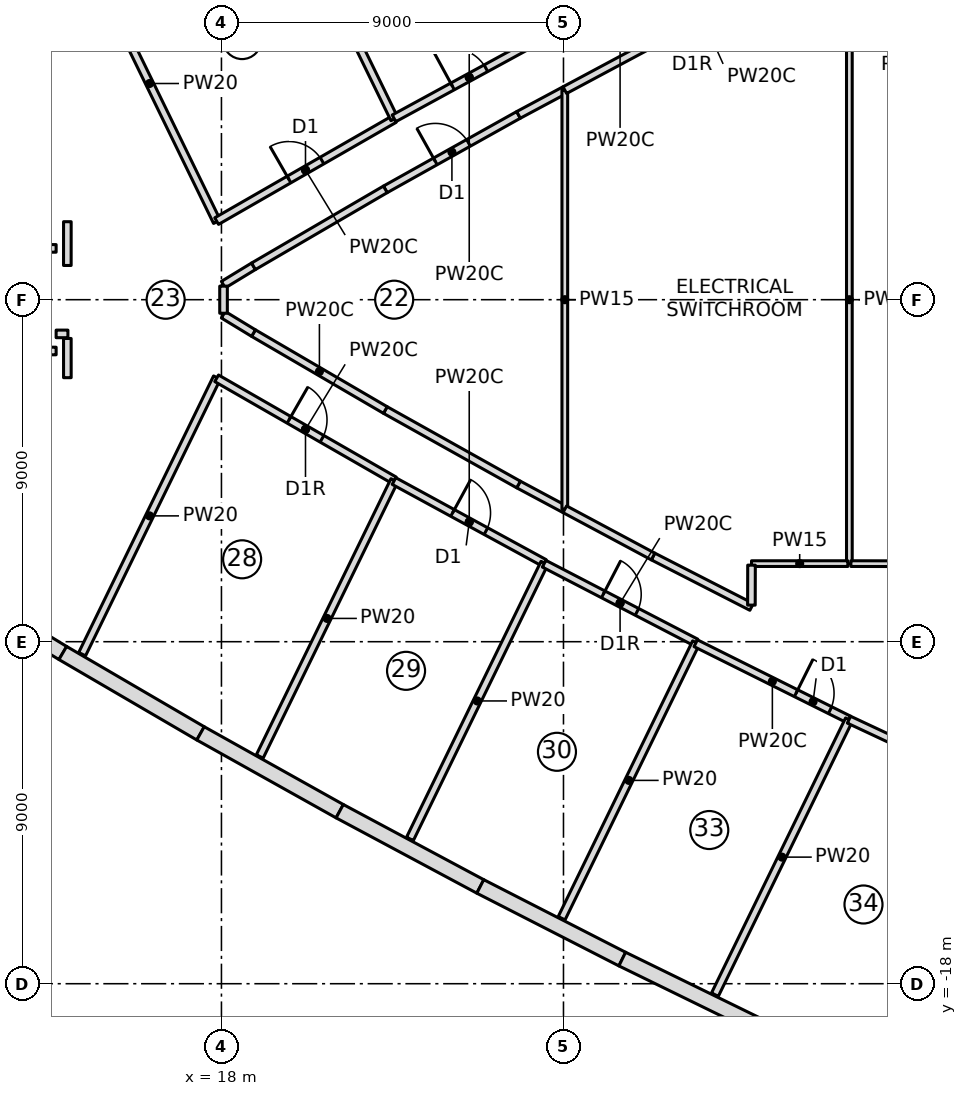
"""IFC4 building model, lengths in metres.
Left out: names, types, materials, properties, quantities, classifications, styles, units other than length and angle.
Written with IfcOpenShell. Run it as: python <this file> out.ifc"""

import sys

from ifc_helpers import new_model, si_unit, direction, frame, frame_2d, origin, place, context, subcontext, project, spatial, polyline, rectangle, outline, extrude, element, fill, save


model = new_model("IFC4")
c1 = context("Model", 3, precision=1e-05, world=origin(), true_north=direction((0.0, 1.0)))
c2 = subcontext(c1, "Body", "Model", "MODEL_VIEW")
j1 = project(units=[si_unit("LENGTHUNIT", "METRE"), si_unit("PLANEANGLEUNIT", "RADIAN")], contexts=[c1])
p1 = place(None, origin())
s1 = spatial("IfcSite", under=j1, at=p1, CompositionType="ELEMENT")
p2 = place(p1, origin())
s2 = spatial("IfcBuilding", under=s1, at=p2, CompositionType="ELEMENT")
p3 = place(p2, frame((0.0, 0.0, 29.0)))
s3 = spatial("IfcBuildingStorey", under=s2, at=p3, CompositionType="ELEMENT", Elevation=29.0)
p4 = place(p3, frame((10.242, -7.116, 0.0), z_axis=(0.0, 0.0, 1.0), x_axis=(0.854262587683, -0.519841736767, 0.0)))
e1 = element("IfcWall", 1, at=p4, inside=s3, PredefinedType="NOTDEFINED", context=c2, shape_type="SweptSolid", body=[
    extrude(outline(polyline([(-0.002, -0.2), (4.198, -0.2), (4.195, 0.2), (0.002, 0.2), (-0.002, -0.2)])), origin(), (0.0, 0.0, 1.0), 5.7),
])
p5 = place(p3, frame((13.826, -9.298, 0.0), z_axis=(0.0, 0.0, 1.0), x_axis=(0.863702918535, -0.504001258445, 0.0)))
e2 = element("IfcWall", 2, at=p5, inside=s3, PredefinedType="NOTDEFINED", context=c2, shape_type="SweptSolid", body=[
    extrude(outline(polyline([(-0.002, -0.2), (4.198, -0.2), (4.194, 0.2), (0.002, 0.2), (-0.002, -0.2)])), origin(), (0.0, 0.0, 1.0), 5.7),
])
p6 = place(p3, frame((17.45, -11.413, 0.0), z_axis=(0.0, 0.0, 1.0), x_axis=(0.872792595997, -0.488091266437, 0.0)))
e3 = element("IfcWall", 3, at=p6, inside=s3, PredefinedType="NOTDEFINED", context=c2, shape_type="SweptSolid", body=[
    extrude(outline(polyline([(-0.002, -0.2), (4.198, -0.2), (4.194, 0.2), (0.002, 0.2), (-0.002, -0.2)])), origin(), (0.0, 0.0, 1.0), 5.7),
])
p7 = place(p3, frame((21.113, -13.461, 0.0), z_axis=(0.0, 0.0, 1.0), x_axis=(0.881678826745, -0.471850025399, 0.0)))
e4 = element("IfcWall", 4, at=p7, inside=s3, PredefinedType="NOTDEFINED", context=c2, shape_type="SweptSolid", body=[
    extrude(outline(polyline([(-0.002, -0.2), (4.198, -0.2), (4.195, 0.2), (0.002, 0.2), (-0.002, -0.2)])), origin(), (0.0, 0.0, 1.0), 5.7),
])
p8 = place(p3, frame((24.812, -15.441, 0.0), z_axis=(0.0, 0.0, 1.0), x_axis=(0.890186701742, -0.455595913108, 0.0)))
e5 = element("IfcWall", 5, at=p8, inside=s3, PredefinedType="NOTDEFINED", context=c2, shape_type="SweptSolid", body=[
    extrude(outline(polyline([(-0.002, -0.2), (4.198, -0.2), (4.194, 0.2), (0.002, 0.2), (-0.002, -0.2)])), origin(), (0.0, 0.0, 1.0), 5.7),
])
p9 = place(p3, frame((28.548, -17.352, 0.0), z_axis=(0.0, 0.0, 1.0), x_axis=(0.898405787198, -0.439166302815, 0.0)))
e6 = element("IfcWall", 6, at=p9, inside=s3, PredefinedType="NOTDEFINED", context=c2, shape_type="SweptSolid", body=[
    extrude(outline(polyline([(-0.002, -0.2), (4.198, -0.2), (4.194, 0.2), (0.002, 0.2), (-0.002, -0.2)])), origin(), (0.0, 0.0, 1.0), 5.7),
])
p10 = place(p3, frame((17.882, 2.05, 0.0), z_axis=(0.0, 0.0, 1.0), x_axis=(-0.43821747413, 0.898868981202, 0.0)))
e7 = element("IfcWall", 7, at=p10, inside=s3, PredefinedType="PARTITIONING", context=c2, shape_type="SweptSolid", body=[
    extrude(rectangle(XDim=8.097, YDim=0.2, at=frame_2d((4.048, 0.0))), origin(), (0.0, 0.0, 1.0), 5.7),
])
p11 = place(p3, frame((17.874, 2.068, 0.0), z_axis=(0.0, 0.0, 1.0), x_axis=(0.867093061484, 0.4981461861, 0.0)))
e8 = element("IfcWall", 8, at=p11, inside=s3, PredefinedType="PARTITIONING", context=c2, shape_type="SweptSolid", body=[
    extrude(rectangle(XDim=5.393, YDim=0.2, at=frame_2d((2.697, 0.0))), origin(), (0.0, 0.0, 1.0), 5.7),
])
p12 = place(p11, frame((2.197, 0.0, 0.0)))
e9 = element("IfcOpeningElement", 9, at=p12, cuts=e8, PredefinedType="OPENING", context=c2, shape_type="SweptSolid", body=[
    extrude(rectangle(XDim=1.0, YDim=2.1, at=frame_2d((0.5, 1.05))), frame((0.0, 0.11, 0.0), z_axis=(0.0, -1.0, 0.0), x_axis=(1.0, 0.0, 0.0)), (0.0, 0.0, 1.0), 0.22),
])
p13 = place(p3, frame((22.55, 4.755, 0.0), z_axis=(0.0, 0.0, 1.0), x_axis=(-0.43821414459, 0.898870604415, 0.0)))
e10 = element("IfcWall", 10, at=p13, inside=s3, PredefinedType="PARTITIONING", context=c2, shape_type="SweptSolid", body=[
    extrude(rectangle(XDim=8.083, YDim=0.2, at=frame_2d((4.042, 0.0))), origin(), (0.0, 0.0, 1.0), 5.7),
])
p14 = place(p3, frame((22.541, 4.773, 0.0), z_axis=(0.0, 0.0, 1.0), x_axis=(0.878098348451, 0.478480188146, 0.0)))
e11 = element("IfcWall", 11, at=p14, inside=s3, PredefinedType="PARTITIONING", context=c2, shape_type="SweptSolid", body=[
    extrude(rectangle(XDim=4.508, YDim=0.2, at=frame_2d((2.254, 0.0))), origin(), (0.0, 0.0, 1.0), 5.7),
])
p15 = place(p14, frame((1.754, 0.0, 0.0)))
e12 = element("IfcOpeningElement", 12, at=p15, cuts=e11, PredefinedType="OPENING", context=c2, shape_type="SweptSolid", body=[
    extrude(rectangle(XDim=1.0, YDim=2.1, at=frame_2d((0.5, 1.05))), frame((0.0, 0.11, 0.0), z_axis=(0.0, -1.0, 0.0), x_axis=(1.0, 0.0, 0.0)), (0.0, 0.0, 1.0), 0.22),
])
p16 = place(p3, frame((14.334, -9.328, 0.0), z_axis=(0.0, 0.0, 1.0), x_axis=(0.43821747413, 0.898868981202, 0.0)))
e13 = element("IfcWall", 13, at=p16, inside=s3, PredefinedType="PARTITIONING", context=c2, shape_type="SweptSolid", body=[
    extrude(rectangle(XDim=8.097, YDim=0.2, at=frame_2d((4.048, 0.0))), origin(), (0.0, 0.0, 1.0), 5.7),
])
p17 = place(p3, frame((17.874, -2.068, 0.0), z_axis=(0.0, 0.0, 1.0), x_axis=(0.867093061484, -0.4981461861, 0.0)))
e14 = element("IfcWall", 14, at=p17, inside=s3, PredefinedType="PARTITIONING", context=c2, shape_type="SweptSolid", body=[
    extrude(rectangle(XDim=5.393, YDim=0.2, at=frame_2d((2.697, 0.0))), origin(), (0.0, 0.0, 1.0), 5.7),
])
p18 = place(p17, frame((2.197, 0.0, 0.0)))
e15 = element("IfcOpeningElement", 15, at=p18, cuts=e14, PredefinedType="OPENING", context=c2, shape_type="SweptSolid", body=[
    extrude(rectangle(XDim=1.0, YDim=2.1, at=frame_2d((0.5, 1.05))), frame((0.0, 0.11, 0.0), z_axis=(0.0, -1.0, 0.0), x_axis=(1.0, 0.0, 0.0)), (0.0, 0.0, 1.0), 0.22),
])
p19 = place(p3, frame((19.008, -12.02, 0.0), z_axis=(0.0, 0.0, 1.0), x_axis=(0.43821414459, 0.898870604415, 0.0)))
e16 = element("IfcWall", 16, at=p19, inside=s3, PredefinedType="PARTITIONING", context=c2, shape_type="SweptSolid", body=[
    extrude(rectangle(XDim=8.083, YDim=0.2, at=frame_2d((4.042, 0.0))), origin(), (0.0, 0.0, 1.0), 5.7),
])
p20 = place(p3, frame((22.541, -4.773, 0.0), z_axis=(0.0, 0.0, 1.0), x_axis=(0.878098348451, -0.478480188146, 0.0)))
e17 = element("IfcWall", 17, at=p20, inside=s3, PredefinedType="PARTITIONING", context=c2, shape_type="SweptSolid", body=[
    extrude(rectangle(XDim=4.508, YDim=0.2, at=frame_2d((2.254, 0.0))), origin(), (0.0, 0.0, 1.0), 5.7),
])
p21 = place(p20, frame((1.754, 0.0, 0.0)))
e18 = element("IfcOpeningElement", 18, at=p21, cuts=e17, PredefinedType="OPENING", context=c2, shape_type="SweptSolid", body=[
    extrude(rectangle(XDim=1.0, YDim=2.1, at=frame_2d((0.5, 1.05))), frame((0.0, 0.11, 0.0), z_axis=(0.0, -1.0, 0.0), x_axis=(1.0, 0.0, 0.0)), (0.0, 0.0, 1.0), 0.22),
])
p22 = place(p3, frame((22.96, -14.188, 0.0), z_axis=(0.0, 0.0, 1.0), x_axis=(0.438206216484, 0.898874469453, 0.0)))
e19 = element("IfcWall", 19, at=p22, inside=s3, PredefinedType="PARTITIONING", context=c2, shape_type="SweptSolid", body=[
    extrude(rectangle(XDim=8.076, YDim=0.2, at=frame_2d((4.038, 0.0))), origin(), (0.0, 0.0, 1.0), 5.7),
])
p23 = place(p3, frame((26.49, -6.948, 0.0), z_axis=(0.0, 0.0, 1.0), x_axis=(0.887638836985, -0.460540220911, 0.0)))
e20 = element("IfcWall", 20, at=p23, inside=s3, PredefinedType="PARTITIONING", context=c2, shape_type="SweptSolid", body=[
    extrude(rectangle(XDim=4.504, YDim=0.2, at=frame_2d((2.252, 0.0))), origin(), (0.0, 0.0, 1.0), 5.7),
])
p24 = place(p23, frame((1.752, 0.0, 0.0)))
e21 = element("IfcOpeningElement", 21, at=p24, cuts=e20, PredefinedType="OPENING", context=c2, shape_type="SweptSolid", body=[
    extrude(rectangle(XDim=1.0, YDim=2.1, at=frame_2d((0.5, 1.05))), frame((0.0, 0.11, 0.0), z_axis=(0.0, -1.0, 0.0), x_axis=(1.0, 0.0, 0.0)), (0.0, 0.0, 1.0), 0.22),
])
p25 = place(p3, frame((26.951, -16.277, 0.0), z_axis=(0.0, 0.0, 1.0), x_axis=(0.438225769904, 0.898864936791, 0.0)))
e22 = element("IfcWall", 22, at=p25, inside=s3, PredefinedType="PARTITIONING", context=c2, shape_type="SweptSolid", body=[
    extrude(rectangle(XDim=8.072, YDim=0.2, at=frame_2d((4.036, 0.0))), origin(), (0.0, 0.0, 1.0), 5.7),
])
p26 = place(p3, frame((30.48, -9.04, 0.0), z_axis=(0.0, 0.0, 1.0), x_axis=(0.894989913054, -0.446086376761, 0.0)))
e23 = element("IfcWall", 23, at=p26, inside=s3, PredefinedType="PARTITIONING", context=c2, shape_type="SweptSolid", body=[
    extrude(rectangle(XDim=4.506, YDim=0.2, at=frame_2d((2.253, 0.0))), origin(), (0.0, 0.0, 1.0), 5.7),
])
p27 = place(p26, frame((2.95, 0.0, 0.0)))
e24 = element("IfcOpeningElement", 24, at=p27, cuts=e23, PredefinedType="OPENING", context=c2, shape_type="SweptSolid", body=[
    extrude(rectangle(XDim=1.0, YDim=2.1, at=frame_2d((0.5, 1.05))), frame((0.0, 0.11, 0.0), z_axis=(0.0, -1.0, 0.0), x_axis=(1.0, 0.0, 0.0)), (0.0, 0.0, 1.0), 0.22),
])
p28 = place(p3, frame((30.985, -18.288, 0.0), z_axis=(0.0, 0.0, 1.0), x_axis=(0.438203778377, 0.89887565804, 0.0)))
e25 = element("IfcWall", 25, at=p28, inside=s3, PredefinedType="PARTITIONING", context=c2, shape_type="SweptSolid", body=[
    extrude(rectangle(XDim=8.052, YDim=0.2, at=frame_2d((4.026, 0.0))), origin(), (0.0, 0.0, 1.0), 5.7),
])
p29 = place(p3, frame((34.512, -11.052, 0.0), z_axis=(0.0, 0.0, 1.0), x_axis=(0.905585758423, -0.424163216394, 0.0)))
e26 = element("IfcWall", 26, at=p29, inside=s3, PredefinedType="PARTITIONING", context=c2, shape_type="SweptSolid", body=[
    extrude(rectangle(XDim=4.507, YDim=0.2, at=frame_2d((2.253, 0.0))), origin(), (0.0, 0.0, 1.0), 5.7),
])
p30 = place(p29, frame((1.753, 0.0, 0.0)))
e27 = element("IfcOpeningElement", 27, at=p30, cuts=e26, PredefinedType="OPENING", context=c2, shape_type="SweptSolid", body=[
    extrude(rectangle(XDim=1.0, YDim=2.1, at=frame_2d((0.5, 1.05))), frame((0.0, 0.11, 0.0), z_axis=(0.0, -1.0, 0.0), x_axis=(1.0, 0.0, 0.0)), (0.0, 0.0, 1.0), 0.22),
])
p31 = place(p3, frame((35.057, -20.219, 0.0), z_axis=(0.0, 0.0, 1.0), x_axis=(0.438201330703, 0.898876851281, 0.0)))
e28 = element("IfcWall", 28, at=p31, inside=s3, PredefinedType="PARTITIONING", context=c2, shape_type="SweptSolid", body=[
    extrude(rectangle(XDim=8.071, YDim=0.2, at=frame_2d((4.036, 0.0))), origin(), (0.0, 0.0, 1.0), 5.7),
])
p32 = place(p3, frame((22.312, 2.903, 0.0), z_axis=(0.0, 0.0, 1.0), x_axis=(0.872800289292, 0.488077509225, 0.0)))
e29 = element("IfcWall", 29, at=p32, inside=s3, PredefinedType="PARTITIONING", context=c2, shape_type="SweptSolid", body=[
    extrude(rectangle(XDim=4.016, YDim=0.2, at=frame_2d((2.008, 0.0))), origin(), (0.0, 0.0, 1.0), 5.7),
])
p33 = place(p32, frame((1.508, 0.0, 0.0)))
e30 = element("IfcOpeningElement", 30, at=p33, cuts=e29, PredefinedType="OPENING", context=c2, shape_type="SweptSolid", body=[
    extrude(rectangle(XDim=1.0, YDim=2.1, at=frame_2d((0.5, 1.05))), frame((0.0, 0.11, 0.0), z_axis=(0.0, -1.0, 0.0), x_axis=(1.0, 0.0, 0.0)), (0.0, 0.0, 1.0), 0.22),
])
p34 = place(p3, frame((27.035, -5.515, 0.0), z_axis=(0.0, 0.0, 1.0), x_axis=(-0.881676934622, 0.471853560922, 0.0)))
e31 = element("IfcWall", 31, at=p34, inside=s3, PredefinedType="PARTITIONING", context=c2, shape_type="SweptSolid", body=[
    extrude(rectangle(XDim=1.382, YDim=0.2, at=frame_2d((0.691, 0.0))), origin(), (0.0, 0.0, 1.0), 5.7),
])
p35 = place(p3, frame((25.817, -4.863, 0.0), z_axis=(0.0, 0.0, 1.0), x_axis=(-0.872800289292, 0.488077509225, 0.0)))
e32 = element("IfcWall", 32, at=p35, inside=s3, PredefinedType="PARTITIONING", context=c2, shape_type="SweptSolid", body=[
    extrude(rectangle(XDim=4.016, YDim=0.2, at=frame_2d((2.008, 0.0))), origin(), (0.0, 0.0, 1.0), 5.7),
])
p36 = place(p3, frame((22.312, -2.903, 0.0), z_axis=(0.0, 0.0, 1.0), x_axis=(-0.863710538269, 0.503988200341, 0.0)))
e33 = element("IfcWall", 33, at=p36, inside=s3, PredefinedType="PARTITIONING", context=c2, shape_type="SweptSolid", body=[
    extrude(rectangle(XDim=4.016, YDim=0.2, at=frame_2d((2.008, 0.0))), origin(), (0.0, 0.0, 1.0), 5.7),
])
for number, where, z_axis, x_axis in (
    (34, (18.844, -0.879, 0.0), (0.0, 0.0, 1.0), (-0.854, 0.52, 0.0)),
    (35, (18.05, 0.396, 0.0), (0.0, 0.0, 1.0), (0.854, 0.52, 0.0)),
):
    element("IfcWall", number, at=place(p3, frame(where, z_axis=z_axis, x_axis=x_axis)), inside=s3, PredefinedType="PARTITIONING", context=c2, shape_type="SweptSolid", body=[
        extrude(rectangle(XDim=0.929, YDim=0.2, at=frame_2d((0.464, 0.0))), origin(), (0.0, 0.0, 1.0), 5.7),
    ])
p37 = place(p3, frame((18.844, 0.879, 0.0), z_axis=(0.0, 0.0, 1.0), x_axis=(0.863710538269, 0.503988200341, 0.0)))
e36 = element("IfcWall", 36, at=p37, inside=s3, PredefinedType="PARTITIONING", context=c2, shape_type="SweptSolid", body=[
    extrude(rectangle(XDim=4.016, YDim=0.2, at=frame_2d((2.008, 0.0))), origin(), (0.0, 0.0, 1.0), 5.7),
])
p38 = place(p3, frame((25.817, 4.863, 0.0), z_axis=(0.0, 0.0, 1.0), x_axis=(0.881676934622, 0.471853560922, 0.0)))
e37 = element("IfcWall", 37, at=p38, inside=s3, PredefinedType="PARTITIONING", context=c2, shape_type="SweptSolid", body=[
    extrude(rectangle(XDim=1.382, YDim=0.2, at=frame_2d((0.691, 0.0))), origin(), (0.0, 0.0, 1.0), 5.7),
])
p39 = place(p3, frame((27.035, -5.515, 0.0), z_axis=(0.0, 0.0, 1.0), x_axis=(0.0, 1.0, 0.0)))
e38 = element("IfcWall", 38, at=p39, inside=s3, PredefinedType="PARTITIONING", context=c2, shape_type="SweptSolid", body=[
    extrude(rectangle(XDim=11.03, YDim=0.15, at=frame_2d((5.515, 0.0))), origin(), (0.0, 0.0, 1.0), 5.7),
])
p40 = place(p3, frame((31.95, -8.085, 0.0), z_axis=(0.0, 0.0, 1.0), x_axis=(-0.890213377055, 0.455543788579, 0.0)))
e39 = element("IfcWall", 39, at=p40, inside=s3, PredefinedType="PARTITIONING", context=c2, shape_type="SweptSolid", body=[
    extrude(rectangle(XDim=2.912, YDim=0.2, at=frame_2d((1.456, 0.0))), origin(), (0.0, 0.0, 1.0), 5.7),
])
for number, where, z_axis, x_axis in (
    (40, (29.357, -6.758, 0.0), (0.0, 0.0, 1.0), (-0.882, 0.472, 0.0)),
    (41, (27.035, 5.515, 0.0), (0.0, 0.0, 1.0), (0.882, 0.472, 0.0)),
):
    element("IfcWall", number, at=place(p3, frame(where, z_axis=z_axis, x_axis=x_axis)), inside=s3, PredefinedType="PARTITIONING", context=c2, shape_type="SweptSolid", body=[
        extrude(rectangle(XDim=2.634, YDim=0.2, at=frame_2d((1.317, 0.0))), origin(), (0.0, 0.0, 1.0), 5.7),
    ])
p41 = place(p3, frame((34.522, -6.95, 0.0), z_axis=(0.0, 0.0, 1.0), x_axis=(0.0, 1.0, 0.0)))
e42 = element("IfcWall", 42, at=p41, inside=s3, PredefinedType="PARTITIONING", context=c2, shape_type="SweptSolid", body=[
    extrude(rectangle(XDim=13.9, YDim=0.15, at=frame_2d((6.95, 0.0))), origin(), (0.0, 0.0, 1.0), 5.7),
])
p42 = place(p3, frame((4.596, 1.35, 0.0), z_axis=(0.0, 0.0, 1.0), x_axis=(1.0, 0.0, 0.0)))
e43 = element("IfcWall", 43, at=p42, inside=s3, PredefinedType="PARTITIONING", context=c2, shape_type="SweptSolid", body=[
    extrude(rectangle(XDim=9.054, YDim=0.2, at=frame_2d((4.527, 0.0))), origin(), (0.0, 0.0, 1.0), 5.7),
])
p43 = place(p42, frame((4.727, 0.0, 0.0)))
e44 = element("IfcOpeningElement", 44, at=p43, cuts=e43, PredefinedType="OPENING", context=c2, shape_type="SweptSolid", body=[
    extrude(rectangle(XDim=1.0, YDim=2.1, at=frame_2d((0.5, 1.05))), frame((0.0, 0.11, 0.0), z_axis=(0.0, -1.0, 0.0), x_axis=(1.0, 0.0, 0.0)), (0.0, 0.0, 1.0), 0.22),
])
p44 = place(p3, frame((4.596, -1.35, 0.0), z_axis=(0.0, 0.0, 1.0), x_axis=(1.0, 0.0, 0.0)))
e45 = element("IfcWall", 45, at=p44, inside=s3, PredefinedType="PARTITIONING", context=c2, shape_type="SweptSolid", body=[
    extrude(rectangle(XDim=9.054, YDim=0.2, at=frame_2d((4.527, 0.0))), origin(), (0.0, 0.0, 1.0), 5.7),
])
p45 = place(p44, frame((4.727, 0.0, 0.0)))
e46 = element("IfcOpeningElement", 46, at=p45, cuts=e45, PredefinedType="OPENING", context=c2, shape_type="SweptSolid", body=[
    extrude(rectangle(XDim=1.0, YDim=2.1, at=frame_2d((0.5, 1.05))), frame((0.0, 0.11, 0.0), z_axis=(0.0, -1.0, 0.0), x_axis=(1.0, 0.0, 0.0)), (0.0, 0.0, 1.0), 0.22),
])
p46 = place(p3, frame((18.055, -0.357, 0.0), z_axis=(0.0, 0.0, 1.0), x_axis=(0.0, 1.0, 0.0)))
e47 = element("IfcWall", 47, at=p46, inside=s3, PredefinedType="PARTITIONING", context=c2, shape_type="SweptSolid", body=[
    extrude(rectangle(XDim=0.713, YDim=0.2, at=frame_2d((0.357, 0.0))), origin(), (0.0, 0.0, 1.0), 5.7),
])
p47 = place(p3, frame((34.482, -6.945, 0.0), z_axis=(0.0, 0.0, 1.0), x_axis=(-0.99999999536, -9.6329833e-05, 0.0)))
e48 = element("IfcWall", 48, at=p47, inside=s3, PredefinedType="PARTITIONING", context=c2, shape_type="SweptSolid", body=[
    extrude(rectangle(XDim=2.534, YDim=0.15, at=frame_2d((1.267, 0.0))), origin(), (0.0, 0.0, 1.0), 5.7),
])
p48 = place(p3, frame((31.948, -6.985, 0.0), z_axis=(0.0, 0.0, 1.0), x_axis=(-0.00278485808, -0.999996122275, 0.0)))
e49 = element("IfcWall", 49, at=p48, inside=s3, PredefinedType="PARTITIONING", context=c2, shape_type="SweptSolid", body=[
    extrude(rectangle(XDim=1.052, YDim=0.2, at=frame_2d((0.526, 0.0))), origin(), (0.0, 0.0, 1.0), 5.7),
])
p49 = place(p3, frame((36.014, -6.948, 0.0), z_axis=(0.0, 0.0, 1.0), x_axis=(-0.999998586248, 0.001681517717, 0.0)))
e50 = element("IfcWall", 50, at=p49, inside=s3, PredefinedType="PARTITIONING", context=c2, shape_type="SweptSolid", body=[
    extrude(rectangle(XDim=1.452, YDim=0.15, at=frame_2d((0.726, 0.0))), origin(), (0.0, 0.0, 1.0), 5.7),
])
p50 = place(p3, frame((13.946, 2.052, 0.0), z_axis=(0.0, 0.0, 1.0), x_axis=(-0.000423818568, -0.999999910189, 0.0)))
e51 = element("IfcWall", 51, at=p50, inside=s3, PredefinedType="PARTITIONING", context=c2, shape_type="SweptSolid", body=[
    extrude(rectangle(XDim=1.152, YDim=0.2, at=frame_2d((0.576, 0.0))), origin(), (0.0, 0.0, 1.0), 5.7),
])
p51 = place(p3, frame((13.65, -0.9, 0.0), z_axis=(0.0, 0.0, 1.0), x_axis=(0.99999876, -0.001574801197, 0.0)))
e52 = element("IfcWall", 52, at=p51, inside=s3, PredefinedType="PARTITIONING", context=c2, shape_type="SweptSolid", body=[
    extrude(rectangle(XDim=0.31, YDim=0.2, at=frame_2d((0.155, 0.0))), origin(), (0.0, 0.0, 1.0), 5.7),
])
p52 = place(p3, frame((13.945, -1.021, 0.0), z_axis=(0.0, 0.0, 1.0), x_axis=(0.000473148752, -0.999999888065, 0.0)))
e53 = element("IfcWall", 53, at=p52, inside=s3, PredefinedType="PARTITIONING", context=c2, shape_type="SweptSolid", body=[
    extrude(rectangle(XDim=1.032, YDim=0.2, at=frame_2d((0.516, 0.0))), origin(), (0.0, 0.0, 1.0), 5.7),
])
p53 = place(p12, origin())
e54 = element("IfcDoor", 54, at=p53, inside=s3, OperationType="SINGLE_SWING_LEFT", PredefinedType="DOOR", context=c2, shape_type="SweptSolid", body=[
    extrude(rectangle(XDim=1.0, YDim=2.1, at=frame_2d((0.5, 1.05))), frame((0.0, 0.025, 0.0), z_axis=(0.0, -1.0, 0.0), x_axis=(1.0, 0.0, 0.0)), (0.0, 0.0, 1.0), 0.05),
])
fill(e9, e54)
p54 = place(p15, origin())
e55 = element("IfcDoor", 55, at=p54, inside=s3, OperationType="SINGLE_SWING_RIGHT", PredefinedType="DOOR", context=c2, shape_type="SweptSolid", body=[
    extrude(rectangle(XDim=1.0, YDim=2.1, at=frame_2d((0.5, 1.05))), frame((0.0, 0.025, 0.0), z_axis=(0.0, -1.0, 0.0), x_axis=(1.0, 0.0, 0.0)), (0.0, 0.0, 1.0), 0.05),
])
fill(e12, e55)
p55 = place(p18, origin())
e56 = element("IfcDoor", 56, at=p55, inside=s3, OperationType="SINGLE_SWING_RIGHT", PredefinedType="DOOR", context=c2, shape_type="SweptSolid", body=[
    extrude(rectangle(XDim=1.0, YDim=2.1, at=frame_2d((0.5, 1.05))), frame((0.0, 0.025, 0.0), z_axis=(0.0, -1.0, 0.0), x_axis=(1.0, 0.0, 0.0)), (0.0, 0.0, 1.0), 0.05),
])
fill(e15, e56)
p56 = place(p21, origin())
e57 = element("IfcDoor", 57, at=p56, inside=s3, OperationType="SINGLE_SWING_LEFT", PredefinedType="DOOR", context=c2, shape_type="SweptSolid", body=[
    extrude(rectangle(XDim=1.0, YDim=2.1, at=frame_2d((0.5, 1.05))), frame((0.0, 0.025, 0.0), z_axis=(0.0, -1.0, 0.0), x_axis=(1.0, 0.0, 0.0)), (0.0, 0.0, 1.0), 0.05),
])
fill(e18, e57)
p57 = place(p24, origin())
e58 = element("IfcDoor", 58, at=p57, inside=s3, OperationType="SINGLE_SWING_RIGHT", PredefinedType="DOOR", context=c2, shape_type="SweptSolid", body=[
    extrude(rectangle(XDim=1.0, YDim=2.1, at=frame_2d((0.5, 1.05))), frame((0.0, 0.025, 0.0), z_axis=(0.0, -1.0, 0.0), x_axis=(1.0, 0.0, 0.0)), (0.0, 0.0, 1.0), 0.05),
])
fill(e21, e58)
p58 = place(p27, origin())
e59 = element("IfcDoor", 59, at=p58, inside=s3, OperationType="SINGLE_SWING_LEFT", PredefinedType="DOOR", context=c2, shape_type="SweptSolid", body=[
    extrude(rectangle(XDim=1.0, YDim=2.1, at=frame_2d((0.5, 1.05))), frame((0.0, 0.025, 0.0), z_axis=(0.0, -1.0, 0.0), x_axis=(1.0, 0.0, 0.0)), (0.0, 0.0, 1.0), 0.05),
])
fill(e24, e59)
p59 = place(p33, origin())
e60 = element("IfcDoor", 60, at=p59, inside=s3, OperationType="SINGLE_SWING_LEFT", PredefinedType="DOOR", context=c2, shape_type="SweptSolid", body=[
    extrude(rectangle(XDim=1.0, YDim=2.1, at=frame_2d((0.5, 1.05))), frame((0.0, 0.025, 0.0), z_axis=(0.0, -1.0, 0.0), x_axis=(1.0, 0.0, 0.0)), (0.0, 0.0, 1.0), 0.05),
])
fill(e30, e60)
save(model, sys.argv[1])
